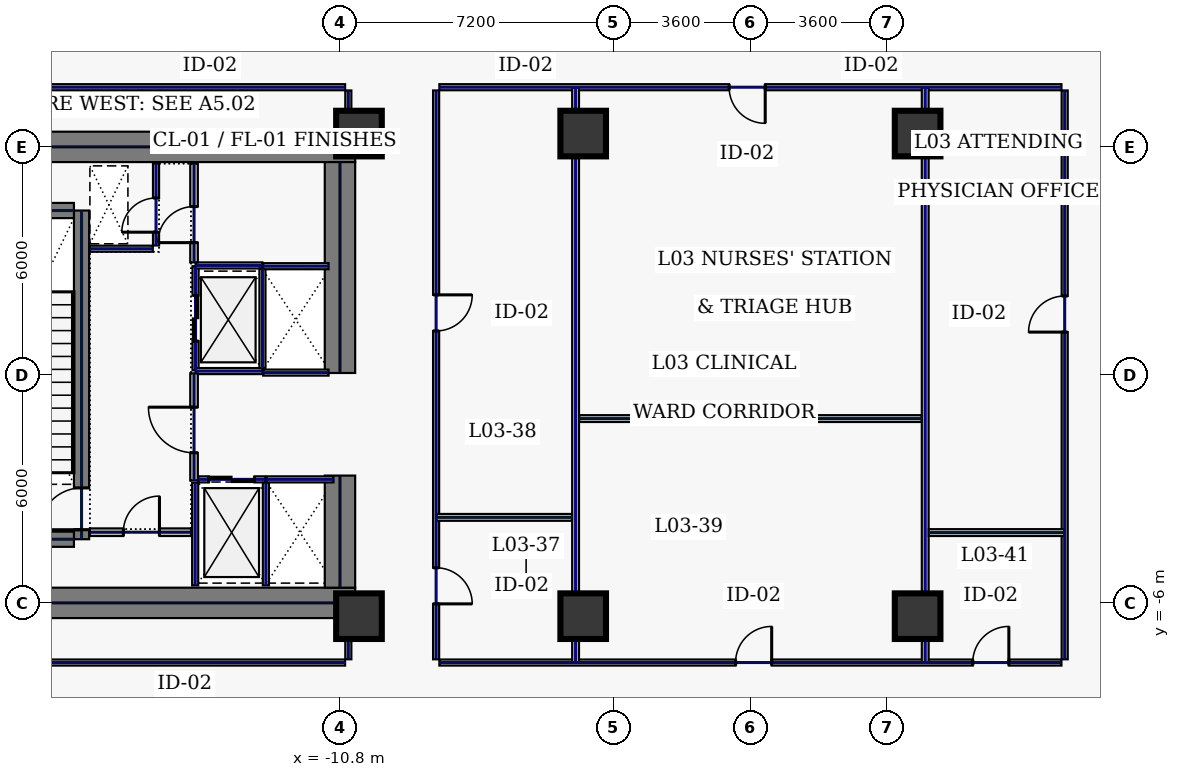
"""IFC4 building model, lengths in metres.
Left out: names, types, materials, properties, quantities, classifications, styles, units other than length and angle.
Written with IfcOpenShell. Run it as: python <this file> out.ifc"""

import sys

from ifc_helpers import new_model, si_unit, direction, frame, frame_2d, origin, origin_2d, place, context, subcontext, project, spatial, rectangle, hollow_rectangle, extrude, element, fill, save


model = new_model("IFC4")
c1 = context("Model", 3, precision=1e-05, world=origin(), true_north=direction((0.0, 1.0)))
c2 = subcontext(c1, "Body", "Model", "MODEL_VIEW")
j1 = project(units=[si_unit("LENGTHUNIT", "METRE"), si_unit("PLANEANGLEUNIT", "RADIAN")], contexts=[c1])
p1 = place(None, origin())
s1 = spatial("IfcSite", under=j1, at=p1, CompositionType="ELEMENT")
p2 = place(p1, origin())
s2 = spatial("IfcBuilding", under=s1, at=p2, CompositionType="ELEMENT")
p3 = place(p2, frame((0.0, 0.0, 18.4)))
s3 = spatial("IfcBuildingStorey", under=s2, at=p3, CompositionType="ELEMENT", Elevation=18.4)
for number, where, z_axis, x_axis in (
    (1, (-22.0, 6.0, 0.0), (0.0, 0.0, 1.0), (1.0, 0.0, 0.0)),
    (2, (-22.0, -6.0, 0.0), (0.0, 0.0, 1.0), (1.0, 0.0, 0.0)),
):
    element("IfcWall", number, at=place(p3, frame(where, z_axis=z_axis, x_axis=x_axis)), inside=s3, PredefinedType="SHEAR", context=c2, shape_type="SweptSolid", body=[
        extrude(rectangle(XDim=11.6, YDim=0.8, at=frame_2d((5.8, 0.0))), origin(), (0.0, 0.0, 1.0), 4.7),
    ])
p4 = place(p3, frame((-10.8, -5.6, 0.0), z_axis=(0.0, 0.0, 1.0), x_axis=(0.0, 1.0, 0.0)))
e3 = element("IfcWall", 3, at=p4, inside=s3, PredefinedType="SHEAR", context=c2, shape_type="SweptSolid", body=[
    extrude(rectangle(XDim=2.95, YDim=0.8, at=frame_2d((1.475, 0.0))), origin(), (0.0, 0.0, 1.0), 4.7),
])
p5 = place(p3, frame((-10.8, 0.05, 0.0), z_axis=(0.0, 0.0, 1.0), x_axis=(0.0, 1.0, 0.0)))
e4 = element("IfcWall", 4, at=p5, inside=s3, PredefinedType="SHEAR", context=c2, shape_type="SweptSolid", body=[
    extrude(rectangle(XDim=5.55, YDim=0.8, at=frame_2d((2.775, 0.0))), origin(), (0.0, 0.0, 1.0), 4.7),
])
p6 = place(p3, frame((-17.6, -4.325, 0.0), z_axis=(0.0, 0.0, 1.0), x_axis=(0.0, 1.0, 0.0)))
e5 = element("IfcWall", 5, at=p6, inside=s3, PredefinedType="SHEAR", context=c2, shape_type="SweptSolid", body=[
    extrude(rectangle(XDim=8.65, YDim=0.4, at=frame_2d((4.325, 0.0))), origin(), (0.0, 0.0, 1.0), 4.7),
])
p7 = place(p6, frame((0.25, 0.0, 0.0)))
e6 = element("IfcOpeningElement", 6, at=p7, cuts=e5, PredefinedType="OPENING", context=c2, shape_type="SweptSolid", body=[
    extrude(rectangle(XDim=1.1, YDim=2.2, at=frame_2d((0.55, 1.1))), frame((0.0, 0.21, 0.0), z_axis=(0.0, -1.0, 0.0), x_axis=(1.0, 0.0, 0.0)), (0.0, 0.0, 1.0), 0.42),
])
for number, where, z_axis, x_axis in (
    (7, (-21.2, -4.325, 0.0), (0.0, 0.0, 1.0), (1.0, 0.0, 0.0)),
    (8, (-21.2, 4.325, 0.0), (0.0, 0.0, 1.0), (1.0, 0.0, 0.0)),
):
    element("IfcWall", number, at=place(p3, frame(where, z_axis=z_axis, x_axis=x_axis)), inside=s3, PredefinedType="SHEAR", context=c2, shape_type="SweptSolid", body=[
        extrude(rectangle(XDim=3.4, YDim=0.4, at=frame_2d((1.7, 0.0))), origin(), (0.0, 0.0, 1.0), 4.7),
    ])
for number, where, z_axis, x_axis in (
    (9, (-10.3, -6.35, 0.0), (0.0, 0.0, 1.0), (1.0, 0.0, 0.0)),
    (10, (-10.3, 6.35, 0.0), (0.0, 0.0, 1.0), (1.0, 0.0, 0.0)),
    (11, (-4.4, -6.35, 0.0), (0.0, 0.0, 1.0), (1.0, 0.0, 0.0)),
    (12, (4.4, -6.35, 0.0), (0.0, 0.0, 1.0), (1.0, 0.0, 0.0)),
    (13, (-4.4, 6.35, 0.0), (0.0, 0.0, 1.0), (1.0, 0.0, 0.0)),
    (14, (4.4, 6.35, 0.0), (0.0, 0.0, 1.0), (1.0, 0.0, 0.0)),
):
    element("IfcColumn", number, at=place(p3, frame(where, z_axis=z_axis, x_axis=x_axis)), inside=s3, PredefinedType="COLUMN", context=c2, shape_type="SweptSolid", body=[
        extrude(hollow_rectangle(XDim=1.2, YDim=1.2, WallThickness=0.05, at=origin_2d()), origin(), (0.0, 0.0, 1.0), 4.7),
    ])
p8 = place(p3, frame((-14.6, 0.12, 0.0), z_axis=(0.0, 0.0, 1.0), x_axis=(0.0, 1.0, 0.0)))
e15 = element("IfcWall", 15, at=p8, inside=s3, PredefinedType="PARTITIONING", context=c2, shape_type="SweptSolid", body=[
    extrude(rectangle(XDim=2.74, YDim=0.16, at=frame_2d((1.37, 0.0))), origin(), (0.0, 0.0, 1.0), 4.7),
])
p9 = place(p8, frame((0.77, 0.0, 0.0)))
e16 = element("IfcOpeningElement", 16, at=p9, cuts=e15, PredefinedType="OPENING", context=c2, shape_type="SweptSolid", body=[
    extrude(rectangle(XDim=1.2, YDim=2.2, at=frame_2d((0.6, 1.1))), frame((0.0, 0.09, 0.0), z_axis=(0.0, -1.0, 0.0), x_axis=(1.0, 0.0, 0.0)), (0.0, 0.0, 1.0), 0.18),
])
for number, where, z_axis, x_axis in (
    (17, (-14.6, 0.1, 0.0), (0.0, 0.0, 1.0), (1.0, 0.0, 0.0)),
    (18, (-14.6, 2.88, 0.0), (0.0, 0.0, 1.0), (1.0, 0.0, 0.0)),
):
    element("IfcWall", number, at=place(p3, frame(where, z_axis=z_axis, x_axis=x_axis)), inside=s3, PredefinedType="PARTITIONING", context=c2, shape_type="SweptSolid", body=[
        extrude(rectangle(XDim=1.76, YDim=0.16, at=frame_2d((0.88, 0.0))), origin(), (0.0, 0.0, 1.0), 4.7),
    ])
p10 = place(p3, frame((-12.84, 0.18, 0.0), z_axis=(0.0, 0.0, 1.0), x_axis=(0.0, 1.0, 0.0)))
e19 = element("IfcWall", 19, at=p10, inside=s3, PredefinedType="PARTITIONING", context=c2, shape_type="SweptSolid", body=[
    extrude(rectangle(XDim=2.62, YDim=0.16, at=frame_2d((1.31, 0.0))), origin(), (0.0, 0.0, 1.0), 4.7),
])
p11 = place(p3, frame((-14.53, -2.75, 0.0), z_axis=(0.0, 0.0, 1.0), x_axis=(1.0, 0.0, 0.0)))
e20 = element("IfcWall", 20, at=p11, inside=s3, PredefinedType="PARTITIONING", context=c2, shape_type="SweptSolid", body=[
    extrude(rectangle(XDim=1.76, YDim=0.16, at=frame_2d((0.88, 0.0))), origin(), (0.0, 0.0, 1.0), 4.7),
])
p12 = place(p11, frame((0.28, 0.0, 0.0)))
e21 = element("IfcOpeningElement", 21, at=p12, cuts=e20, PredefinedType="OPENING", context=c2, shape_type="SweptSolid", body=[
    extrude(rectangle(XDim=1.2, YDim=2.2, at=frame_2d((0.6, 1.1))), frame((0.0, 0.09, 0.0), z_axis=(0.0, -1.0, 0.0), x_axis=(1.0, 0.0, 0.0)), (0.0, 0.0, 1.0), 0.18),
])
for number, where, z_axis, x_axis in (
    (22, (-12.75, -5.54, 0.0), (0.0, 0.0, 1.0), (0.0, 1.0, 0.0)),
    (23, (-14.61, -5.54, 0.0), (0.0, 0.0, 1.0), (0.0, 1.0, 0.0)),
):
    element("IfcWall", number, at=place(p3, frame(where, z_axis=z_axis, x_axis=x_axis)), inside=s3, PredefinedType="PARTITIONING", context=c2, shape_type="SweptSolid", body=[
        extrude(rectangle(XDim=2.7, YDim=0.16, at=frame_2d((1.35, 0.0))), origin(), (0.0, 0.0, 1.0), 4.7),
    ])
p13 = place(p3, frame((-12.73, -2.75, 0.0), z_axis=(0.0, 0.0, 1.0), x_axis=(1.0, 0.0, 0.0)))
e24 = element("IfcWall", 24, at=p13, inside=s3, PredefinedType="PARTITIONING", context=c2, shape_type="SweptSolid", body=[
    extrude(rectangle(XDim=1.76, YDim=0.16, at=frame_2d((0.88, 0.0))), origin(), (0.0, 0.0, 1.0), 4.7),
])
for number, where, z_axis, x_axis in (
    (25, (-12.82, 0.06, 0.0), (0.0, 0.0, 1.0), (1.0, 0.0, 0.0)),
    (26, (-12.82, 2.86, 0.0), (0.0, 0.0, 1.0), (1.0, 0.0, 0.0)),
):
    element("IfcWall", number, at=place(p3, frame(where, z_axis=z_axis, x_axis=x_axis)), inside=s3, PredefinedType="PARTITIONING", context=c2, shape_type="SweptSolid", body=[
        extrude(rectangle(XDim=1.72, YDim=0.16, at=frame_2d((0.86, 0.0))), origin(), (0.0, 0.0, 1.0), 4.7),
    ])
p14 = place(p3, frame((-15.64, 3.405, 0.0), z_axis=(0.0, 0.0, 1.0), x_axis=(0.0, 1.0, 0.0)))
e27 = element("IfcWall", 27, at=p14, inside=s3, PredefinedType="PARTITIONING", context=c2, shape_type="SweptSolid", body=[
    extrude(rectangle(XDim=2.155, YDim=0.16, at=frame_2d((1.078, 0.0))), origin(), (0.0, 0.0, 1.0), 4.7),
])
p15 = place(p14, frame((0.35, 0.0, 0.0)))
e28 = element("IfcOpeningElement", 28, at=p15, cuts=e27, PredefinedType="OPENING", context=c2, shape_type="SweptSolid", body=[
    extrude(rectangle(XDim=0.9, YDim=2.2, at=frame_2d((0.45, 1.1))), frame((0.0, 0.09, 0.0), z_axis=(0.0, -1.0, 0.0), x_axis=(1.0, 0.0, 0.0)), (0.0, 0.0, 1.0), 0.18),
])
p16 = place(p3, frame((-17.38, 3.32, 0.0), z_axis=(0.0, 0.0, 1.0), x_axis=(1.0, 0.0, 0.0)))
e29 = element("IfcWall", 29, at=p16, inside=s3, PredefinedType="PARTITIONING", context=c2, shape_type="SweptSolid", body=[
    extrude(rectangle(XDim=1.655, YDim=0.16, at=frame_2d((0.827, 0.0))), origin(), (0.0, 0.0, 1.0), 4.7),
])
p17 = place(p3, frame((-17.38, -4.14, 0.0), z_axis=(0.0, 0.0, 1.0), x_axis=(1.0, 0.0, 0.0)))
e30 = element("IfcWall", 30, at=p17, inside=s3, PredefinedType="SOLIDWALL", context=c2, shape_type="SweptSolid", body=[
    extrude(rectangle(XDim=2.66, YDim=0.2, at=frame_2d((1.33, 0.0))), origin(), (0.0, 0.0, 1.0), 4.7),
])
p18 = place(p17, frame((0.88, 0.0, 0.0)))
e31 = element("IfcOpeningElement", 31, at=p18, cuts=e30, PredefinedType="OPENING", context=c2, shape_type="SweptSolid", body=[
    extrude(rectangle(XDim=0.95, YDim=2.2, at=frame_2d((0.475, 1.1))), frame((0.0, 0.11, 0.0), z_axis=(0.0, -1.0, 0.0), x_axis=(1.0, 0.0, 0.0)), (0.0, 0.0, 1.0), 0.22),
])
p19 = place(p3, frame((-14.64, 2.96, 0.0), z_axis=(0.0, 0.0, 1.0), x_axis=(0.0, 1.0, 0.0)))
e32 = element("IfcWall", 32, at=p19, inside=s3, PredefinedType="SOLIDWALL", context=c2, shape_type="SweptSolid", body=[
    extrude(rectangle(XDim=2.6, YDim=0.2, at=frame_2d((1.3, 0.0))), origin(), (0.0, 0.0, 1.0), 4.7),
])
p20 = place(p19, frame((0.52, 0.0, 0.0)))
e33 = element("IfcOpeningElement", 33, at=p20, cuts=e32, PredefinedType="OPENING", context=c2, shape_type="SweptSolid", body=[
    extrude(rectangle(XDim=0.95, YDim=2.2, at=frame_2d((0.475, 1.1))), frame((0.0, 0.11, 0.0), z_axis=(0.0, -1.0, 0.0), x_axis=(1.0, 0.0, 0.0)), (0.0, 0.0, 1.0), 0.22),
])
p21 = place(p3, frame((-14.64, -2.78, 0.0), z_axis=(0.0, 0.0, 1.0), x_axis=(0.0, 1.0, 0.0)))
e34 = element("IfcWall", 34, at=p21, inside=s3, PredefinedType="SOLIDWALL", context=c2, shape_type="SweptSolid", body=[
    extrude(rectangle(XDim=2.82, YDim=0.2, at=frame_2d((1.41, 0.0))), origin(), (0.0, 0.0, 1.0), 4.7),
])
p22 = place(p21, frame((0.73, 0.0, 0.0)))
e35 = element("IfcOpeningElement", 35, at=p22, cuts=e34, PredefinedType="OPENING", context=c2, shape_type="SweptSolid", body=[
    extrude(rectangle(XDim=1.2, YDim=2.2, at=frame_2d((0.6, 1.1))), frame((0.0, 0.11, 0.0), z_axis=(0.0, -1.0, 0.0), x_axis=(1.0, 0.0, 0.0)), (0.0, 0.0, 1.0), 0.22),
])
p23 = place(p3, frame((8.185, 7.57, 0.0), z_axis=(0.0, 0.0, 1.0), x_axis=(-1.0, 0.0, 0.0)))
e36 = element("IfcWall", 36, at=p23, inside=s3, PredefinedType="PARTITIONING", context=c2, shape_type="SweptSolid", body=[
    extrude(rectangle(XDim=16.37, YDim=0.16, at=frame_2d((8.185, 0.0))), origin(), (0.0, 0.0, 1.0), 4.7),
])
p24 = place(p23, frame((7.795, 0.0, 0.0)))
e37 = element("IfcOpeningElement", 37, at=p24, cuts=e36, PredefinedType="OPENING", context=c2, shape_type="SweptSolid", body=[
    extrude(rectangle(XDim=0.95, YDim=2.2, at=frame_2d((0.475, 1.1))), frame((0.0, 0.09, 0.0), z_axis=(0.0, -1.0, 0.0), x_axis=(1.0, 0.0, 0.0)), (0.0, 0.0, 1.0), 0.18),
])
p25 = place(p3, frame((-8.27, 7.485, 0.0), z_axis=(0.0, 0.0, 1.0), x_axis=(0.0, -1.0, 0.0)))
e38 = element("IfcWall", 38, at=p25, inside=s3, PredefinedType="PARTITIONING", context=c2, shape_type="SweptSolid", body=[
    extrude(rectangle(XDim=14.97, YDim=0.16, at=frame_2d((7.485, 0.0))), origin(), (0.0, 0.0, 1.0), 4.7),
])
p26 = place(p25, frame((12.561, 0.0, 0.0)))
e39 = element("IfcOpeningElement", 39, at=p26, cuts=e38, PredefinedType="OPENING", context=c2, shape_type="SweptSolid", body=[
    extrude(rectangle(XDim=0.95, YDim=2.2, at=frame_2d((0.475, 1.1))), frame((0.0, 0.09, 0.0), z_axis=(0.0, -1.0, 0.0), x_axis=(1.0, 0.0, 0.0)), (0.0, 0.0, 1.0), 0.18),
])
p27 = place(p25, frame((5.379, 0.0, 0.0)))
e40 = element("IfcOpeningElement", 40, at=p27, cuts=e38, PredefinedType="OPENING", context=c2, shape_type="SweptSolid", body=[
    extrude(rectangle(XDim=0.95, YDim=2.2, at=frame_2d((0.475, 1.1))), frame((0.0, 0.09, 0.0), z_axis=(0.0, -1.0, 0.0), x_axis=(1.0, 0.0, 0.0)), (0.0, 0.0, 1.0), 0.18),
])
p28 = place(p3, frame((-8.185, -7.57, 0.0), z_axis=(0.0, 0.0, 1.0), x_axis=(1.0, 0.0, 0.0)))
e41 = element("IfcWall", 41, at=p28, inside=s3, PredefinedType="PARTITIONING", context=c2, shape_type="SweptSolid", body=[
    extrude(rectangle(XDim=16.37, YDim=0.16, at=frame_2d((8.185, 0.0))), origin(), (0.0, 0.0, 1.0), 4.7),
])
p29 = place(p28, frame((7.795, 0.0, 0.0)))
e42 = element("IfcOpeningElement", 42, at=p29, cuts=e41, PredefinedType="OPENING", context=c2, shape_type="SweptSolid", body=[
    extrude(rectangle(XDim=0.95, YDim=2.2, at=frame_2d((0.475, 1.1))), frame((0.0, 0.09, 0.0), z_axis=(0.0, -1.0, 0.0), x_axis=(1.0, 0.0, 0.0)), (0.0, 0.0, 1.0), 0.18),
])
p30 = place(p28, frame((14.036, 0.0, 0.0)))
e43 = element("IfcOpeningElement", 43, at=p30, cuts=e41, PredefinedType="OPENING", context=c2, shape_type="SweptSolid", body=[
    extrude(rectangle(XDim=0.95, YDim=2.2, at=frame_2d((0.475, 1.1))), frame((0.0, 0.09, 0.0), z_axis=(0.0, -1.0, 0.0), x_axis=(1.0, 0.0, 0.0)), (0.0, 0.0, 1.0), 0.18),
])
p31 = place(p3, frame((8.27, -7.485, 0.0), z_axis=(0.0, 0.0, 1.0), x_axis=(0.0, 1.0, 0.0)))
e44 = element("IfcWall", 44, at=p31, inside=s3, PredefinedType="PARTITIONING", context=c2, shape_type="SweptSolid", body=[
    extrude(rectangle(XDim=14.97, YDim=0.16, at=frame_2d((7.485, 0.0))), origin(), (0.0, 0.0, 1.0), 4.7),
])
p32 = place(p31, frame((8.611, 0.0, 0.0)))
e45 = element("IfcOpeningElement", 45, at=p32, cuts=e44, PredefinedType="OPENING", context=c2, shape_type="SweptSolid", body=[
    extrude(rectangle(XDim=0.95, YDim=2.2, at=frame_2d((0.475, 1.1))), frame((0.0, 0.09, 0.0), z_axis=(0.0, -1.0, 0.0), x_axis=(1.0, 0.0, 0.0)), (0.0, 0.0, 1.0), 0.18),
])
for number, where, z_axis, x_axis in (
    (46, (-10.58, -7.485, 0.0), (0.0, 0.0, 1.0), (0.0, 1.0, 0.0)),
    (47, (-10.58, 6.42, 0.0), (0.0, 0.0, 1.0), (0.0, 1.0, 0.0)),
):
    element("IfcWall", number, at=place(p3, frame(where, z_axis=z_axis, x_axis=x_axis)), inside=s3, PredefinedType="PARTITIONING", context=c2, shape_type="SweptSolid", body=[
        extrude(rectangle(XDim=1.065, YDim=0.16, at=frame_2d((0.533, 0.0))), origin(), (0.0, 0.0, 1.0), 4.7),
    ])
for number, where, z_axis, x_axis in (
    (48, (-10.665, 7.57, 0.0), (0.0, 0.0, 1.0), (-1.0, 0.0, 0.0)),
    (49, (-27.185, -7.57, 0.0), (0.0, 0.0, 1.0), (1.0, 0.0, 0.0)),
):
    element("IfcWall", number, at=place(p3, frame(where, z_axis=z_axis, x_axis=x_axis)), inside=s3, PredefinedType="PARTITIONING", context=c2, shape_type="SweptSolid", body=[
        extrude(rectangle(XDim=16.52, YDim=0.16, at=frame_2d((8.26, 0.0))), origin(), (0.0, 0.0, 1.0), 4.7),
    ])
for number, where, z_axis, x_axis in (
    (50, (-4.6, -7.565, 0.0), (0.0, 0.0, 1.0), (0.0, 1.0, 0.0)),
    (51, (4.6, -7.565, 0.0), (0.0, 0.0, 1.0), (0.0, 1.0, 0.0)),
):
    element("IfcWall", number, at=place(p3, frame(where, z_axis=z_axis, x_axis=x_axis)), inside=s3, PredefinedType="PARTITIONING", context=c2, shape_type="SweptSolid", body=[
        extrude(rectangle(XDim=15.13, YDim=0.18, at=frame_2d((7.565, 0.0))), origin(), (0.0, 0.0, 1.0), 3.895),
    ])
p33 = place(p3, frame((-4.505, -1.15, 0.0), z_axis=(0.0, 0.0, 1.0), x_axis=(1.0, 0.0, 0.0)))
e52 = element("IfcWall", 52, at=p33, inside=s3, PredefinedType="PARTITIONING", context=c2, shape_type="SweptSolid", body=[
    extrude(rectangle(XDim=9.01, YDim=0.18, at=frame_2d((4.505, 0.0))), origin(), (0.0, 0.0, 1.0), 4.7),
])
for number, where, z_axis, x_axis in (
    (53, (-8.265, -3.75, 0.0), (0.0, 0.0, 1.0), (1.0, 0.0, 0.0)),
    (54, (4.695, -4.15, 0.0), (0.0, 0.0, 1.0), (1.0, 0.0, 0.0)),
):
    element("IfcWall", number, at=place(p3, frame(where, z_axis=z_axis, x_axis=x_axis)), inside=s3, PredefinedType="PARTITIONING", context=c2, shape_type="SweptSolid", body=[
        extrude(rectangle(XDim=3.57, YDim=0.18, at=frame_2d((1.785, 0.0))), origin(), (0.0, 0.0, 1.0), 4.7),
    ])
p34 = place(p7, origin())
e55 = element("IfcDoor", 55, at=p34, inside=s3, OperationType="SINGLE_SWING_LEFT", PredefinedType="DOOR", context=c2, shape_type="SweptSolid", body=[
    extrude(rectangle(XDim=1.1, YDim=2.2, at=frame_2d((0.55, 1.1))), frame((0.0, 0.025, 0.0), z_axis=(0.0, -1.0, 0.0), x_axis=(1.0, 0.0, 0.0)), (0.0, 0.0, 1.0), 0.05),
])
fill(e6, e55)
p35 = place(p9, origin())
e56 = element("IfcDoor", 56, at=p35, inside=s3, OperationType="SLIDING_TO_LEFT", PredefinedType="DOOR", context=c2, shape_type="SweptSolid", body=[
    extrude(rectangle(XDim=1.2, YDim=2.2, at=frame_2d((0.6, 1.1))), frame((0.0, 0.025, 0.0), z_axis=(0.0, -1.0, 0.0), x_axis=(1.0, 0.0, 0.0)), (0.0, 0.0, 1.0), 0.05),
])
fill(e16, e56)
p36 = place(p12, origin())
e57 = element("IfcDoor", 57, at=p36, inside=s3, OperationType="SLIDING_TO_LEFT", PredefinedType="DOOR", context=c2, shape_type="SweptSolid", body=[
    extrude(rectangle(XDim=1.2, YDim=2.2, at=frame_2d((0.6, 1.1))), frame((0.0, 0.025, 0.0), z_axis=(0.0, -1.0, 0.0), x_axis=(1.0, 0.0, 0.0)), (0.0, 0.0, 1.0), 0.05),
])
fill(e21, e57)
p37 = place(p15, origin())
e58 = element("IfcDoor", 58, at=p37, inside=s3, OperationType="SINGLE_SWING_LEFT", PredefinedType="DOOR", context=c2, shape_type="SweptSolid", body=[
    extrude(rectangle(XDim=0.9, YDim=2.2, at=frame_2d((0.45, 1.1))), frame((0.0, 0.025, 0.0), z_axis=(0.0, -1.0, 0.0), x_axis=(1.0, 0.0, 0.0)), (0.0, 0.0, 1.0), 0.05),
])
fill(e28, e58)
p38 = place(p18, origin())
e59 = element("IfcDoor", 59, at=p38, inside=s3, OperationType="SINGLE_SWING_RIGHT", PredefinedType="DOOR", context=c2, shape_type="SweptSolid", body=[
    extrude(rectangle(XDim=0.95, YDim=2.2, at=frame_2d((0.475, 1.1))), frame((0.0, 0.025, 0.0), z_axis=(0.0, -1.0, 0.0), x_axis=(1.0, 0.0, 0.0)), (0.0, 0.0, 1.0), 0.05),
])
fill(e31, e59)
p39 = place(p20, origin())
e60 = element("IfcDoor", 60, at=p39, inside=s3, OperationType="SINGLE_SWING_LEFT", PredefinedType="DOOR", context=c2, shape_type="SweptSolid", body=[
    extrude(rectangle(XDim=0.95, YDim=2.2, at=frame_2d((0.475, 1.1))), frame((0.0, 0.025, 0.0), z_axis=(0.0, -1.0, 0.0), x_axis=(1.0, 0.0, 0.0)), (0.0, 0.0, 1.0), 0.05),
])
fill(e33, e60)
p40 = place(p22, origin())
e61 = element("IfcDoor", 61, at=p40, inside=s3, OperationType="SINGLE_SWING_RIGHT", PredefinedType="DOOR", context=c2, shape_type="SweptSolid", body=[
    extrude(rectangle(XDim=1.2, YDim=2.2, at=frame_2d((0.6, 1.1))), frame((0.0, 0.025, 0.0), z_axis=(0.0, -1.0, 0.0), x_axis=(1.0, 0.0, 0.0)), (0.0, 0.0, 1.0), 0.05),
])
fill(e35, e61)
p41 = place(p26, origin())
e62 = element("IfcDoor", 62, at=p41, inside=s3, OperationType="SINGLE_SWING_RIGHT", PredefinedType="DOOR", context=c2, shape_type="SweptSolid", body=[
    extrude(rectangle(XDim=0.95, YDim=2.2, at=frame_2d((0.475, 1.1))), frame((0.0, 0.025, 0.0), z_axis=(0.0, -1.0, 0.0), x_axis=(1.0, 0.0, 0.0)), (0.0, 0.0, 1.0), 0.05),
])
fill(e39, e62)
p42 = place(p27, origin())
e63 = element("IfcDoor", 63, at=p42, inside=s3, OperationType="SINGLE_SWING_LEFT", PredefinedType="DOOR", context=c2, shape_type="SweptSolid", body=[
    extrude(rectangle(XDim=0.95, YDim=2.2, at=frame_2d((0.475, 1.1))), frame((0.0, 0.025, 0.0), z_axis=(0.0, -1.0, 0.0), x_axis=(1.0, 0.0, 0.0)), (0.0, 0.0, 1.0), 0.05),
])
fill(e40, e63)
p43 = place(p29, origin())
e64 = element("IfcDoor", 64, at=p43, inside=s3, OperationType="SINGLE_SWING_RIGHT", PredefinedType="DOOR", context=c2, shape_type="SweptSolid", body=[
    extrude(rectangle(XDim=0.95, YDim=2.2, at=frame_2d((0.475, 1.1))), frame((0.0, 0.025, 0.0), z_axis=(0.0, -1.0, 0.0), x_axis=(1.0, 0.0, 0.0)), (0.0, 0.0, 1.0), 0.05),
])
fill(e42, e64)
p44 = place(p24, origin())
e65 = element("IfcDoor", 65, at=p44, inside=s3, OperationType="SINGLE_SWING_LEFT", PredefinedType="DOOR", context=c2, shape_type="SweptSolid", body=[
    extrude(rectangle(XDim=0.95, YDim=2.2, at=frame_2d((0.475, 1.1))), frame((0.0, 0.025, 0.0), z_axis=(0.0, -1.0, 0.0), x_axis=(1.0, 0.0, 0.0)), (0.0, 0.0, 1.0), 0.05),
])
fill(e37, e65)
p45 = place(p30, origin())
e66 = element("IfcDoor", 66, at=p45, inside=s3, OperationType="SINGLE_SWING_RIGHT", PredefinedType="DOOR", context=c2, shape_type="SweptSolid", body=[
    extrude(rectangle(XDim=0.95, YDim=2.2, at=frame_2d((0.475, 1.1))), frame((0.0, 0.025, 0.0), z_axis=(0.0, -1.0, 0.0), x_axis=(1.0, 0.0, 0.0)), (0.0, 0.0, 1.0), 0.05),
])
fill(e43, e66)
p46 = place(p32, origin())
e67 = element("IfcDoor", 67, at=p46, inside=s3, OperationType="SINGLE_SWING_LEFT", PredefinedType="DOOR", context=c2, shape_type="SweptSolid", body=[
    extrude(rectangle(XDim=0.95, YDim=2.2, at=frame_2d((0.475, 1.1))), frame((0.0, 0.025, 0.0), z_axis=(0.0, -1.0, 0.0), x_axis=(1.0, 0.0, 0.0)), (0.0, 0.0, 1.0), 0.05),
])
fill(e45, e67)
save(model, sys.argv[1])
